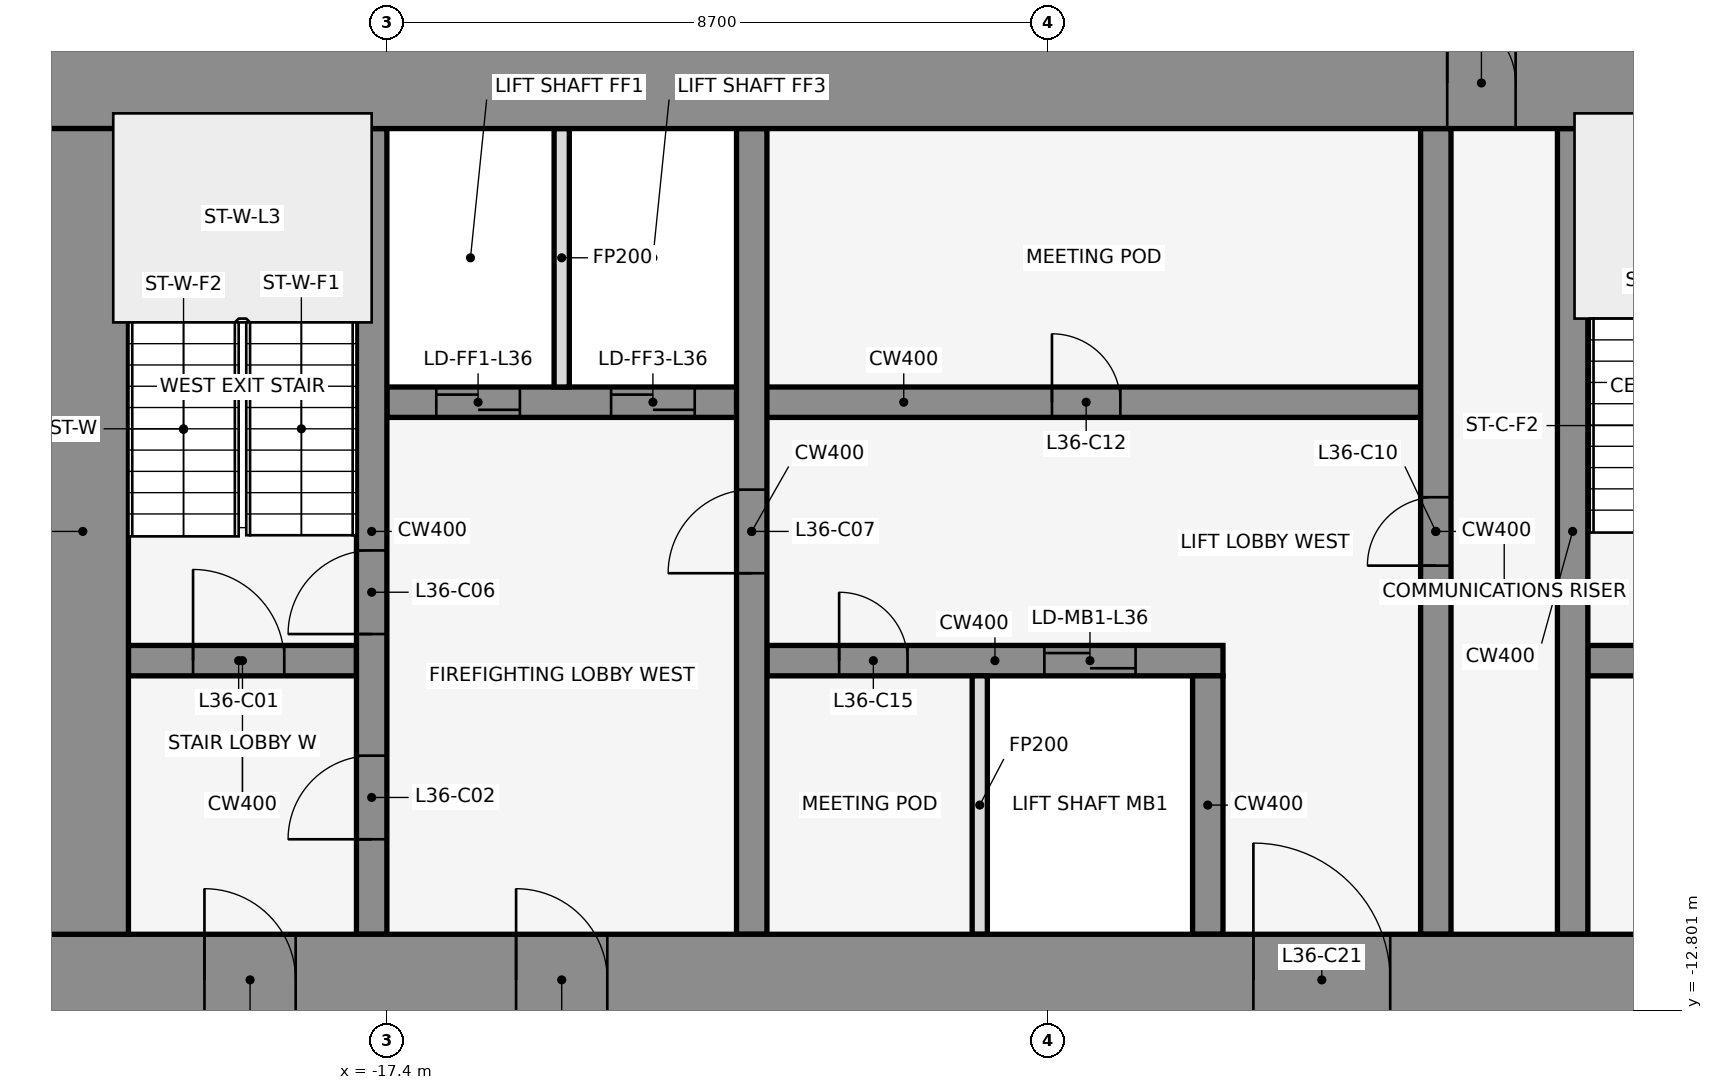
"""IFC4 building model, lengths in metres.
Left out: names, types, materials, properties, quantities, classifications, styles, units other than length and angle.
Written with IfcOpenShell. Run it as: python <this file> out.ifc"""

import sys

from ifc_helpers import new_model, si_unit, direction, frame, frame_2d, origin, place, context, subcontext, project, spatial, rectangle, extrude, element, fill, save


model = new_model("IFC4")
c1 = context("Model", 3, precision=1e-05, world=origin(), true_north=direction((0.0, 1.0)))
c2 = subcontext(c1, "Body", "Model", "MODEL_VIEW")
j1 = project(units=[si_unit("LENGTHUNIT", "METRE"), si_unit("PLANEANGLEUNIT", "RADIAN")], contexts=[c1])
p1 = place(None, origin())
s1 = spatial("IfcSite", under=j1, at=p1, CompositionType="ELEMENT")
p2 = place(p1, origin())
s2 = spatial("IfcBuilding", under=s1, at=p2, CompositionType="ELEMENT")
p3 = place(p2, frame((0.0, 0.0, 165.0)))
s3 = spatial("IfcBuildingStorey", under=s2, at=p3, CompositionType="ELEMENT", Elevation=165.0)
for number, where, z_axis, x_axis in (
    (1, (-0.068, -0.105, 0.0), (0.0, 0.0, 1.0), (-0.84, 0.543, 0.0)),
    (2, (-14.599, 1.08, 0.0), (0.0, 0.0, 1.0), (-0.84, -0.543, 0.0)),
):
    element("IfcWall", number, at=place(p3, frame(where, z_axis=z_axis, x_axis=x_axis)), inside=s3, PredefinedType="STANDARD", context=c2, shape_type="SweptSolid", body=[
        extrude(rectangle(XDim=2.183, YDim=0.25, at=frame_2d((1.091, 0.0))), origin(), (0.0, 0.0, 1.0), 3.95),
    ])
p4 = place(p3, frame((-20.8, -8.2, 0.0), z_axis=(0.0, 0.0, 1.0), x_axis=(1.0, 0.0, 0.0)))
e3 = element("IfcWall", 3, at=p4, inside=s3, PredefinedType="SHEAR", context=c2, shape_type="SweptSolid", body=[
    extrude(rectangle(XDim=3.0, YDim=0.4, at=frame_2d((1.5, 0.0))), origin(), (0.0, 0.0, 1.0), 4.1),
])
p5 = place(p4, frame((0.85, 0.0, 0.0)))
e4 = element("IfcOpeningElement", 4, at=p5, cuts=e3, PredefinedType="OPENING", context=c2, shape_type="SweptSolid", body=[
    extrude(rectangle(XDim=1.2, YDim=2.1, at=frame_2d((0.6, 1.05))), frame((0.0, 0.212, 0.0), z_axis=(0.0, -1.0, 0.0), x_axis=(1.0, 0.0, 0.0)), (0.0, 0.0, 1.0), 0.424),
])
p6 = place(p3, frame((-12.4, -8.2, 0.0), z_axis=(0.0, 0.0, 1.0), x_axis=(1.0, 0.0, 0.0)))
e5 = element("IfcWall", 5, at=p6, inside=s3, PredefinedType="SHEAR", context=c2, shape_type="SweptSolid", body=[
    extrude(rectangle(XDim=6.0, YDim=0.4, at=frame_2d((3.0, 0.0))), origin(), (0.0, 0.0, 1.0), 4.1),
])
p7 = place(p6, frame((3.65, 0.0, 0.0)))
e6 = element("IfcOpeningElement", 6, at=p7, cuts=e5, PredefinedType="OPENING", context=c2, shape_type="SweptSolid", body=[
    extrude(rectangle(XDim=1.2, YDim=2.1, at=frame_2d((0.6, 1.05))), frame((0.0, 0.212, 0.0), z_axis=(0.0, -1.0, 0.0), x_axis=(1.0, 0.0, 0.0)), (0.0, 0.0, 1.0), 0.424),
])
p8 = place(p6, frame((0.95, 0.0, 0.0)))
e7 = element("IfcOpeningElement", 7, at=p8, cuts=e5, PredefinedType="OPENING", context=c2, shape_type="SweptSolid", body=[
    extrude(rectangle(XDim=0.9, YDim=2.1, at=frame_2d((0.45, 1.05))), frame((0.0, 0.212, 0.0), z_axis=(0.0, -1.0, 0.0), x_axis=(1.0, 0.0, 0.0)), (0.0, 0.0, 1.0), 0.424),
])
p9 = place(p3, frame((-1.6, -8.2, 0.0), z_axis=(0.0, 0.0, 1.0), x_axis=(1.0, 0.0, 0.0)))
e8 = element("IfcWall", 8, at=p9, inside=s3, PredefinedType="SHEAR", context=c2, shape_type="SweptSolid", body=[
    extrude(rectangle(XDim=3.2, YDim=0.4, at=frame_2d((1.6, 0.0))), origin(), (0.0, 0.0, 1.0), 4.1),
])
p10 = place(p9, frame((1.05, 0.0, 0.0)))
e9 = element("IfcOpeningElement", 9, at=p10, cuts=e8, PredefinedType="OPENING", context=c2, shape_type="SweptSolid", body=[
    extrude(rectangle(XDim=1.2, YDim=2.1, at=frame_2d((0.6, 1.05))), frame((0.0, 0.212, 0.0), z_axis=(0.0, -1.0, 0.0), x_axis=(1.0, 0.0, 0.0)), (0.0, 0.0, 1.0), 0.424),
])
p11 = place(p3, frame((-17.4, -4.8, 0.0), z_axis=(0.0, 0.0, 1.0), x_axis=(1.0, 0.0, 0.0)))
e10 = element("IfcWall", 10, at=p11, inside=s3, PredefinedType="SHEAR", context=c2, shape_type="SweptSolid", body=[
    extrude(rectangle(XDim=13.6, YDim=0.4, at=frame_2d((6.8, 0.0))), origin(), (0.0, 0.0, 1.0), 4.1),
])
p12 = place(p11, frame((0.65, 0.0, 0.0)))
e11 = element("IfcOpeningElement", 11, at=p12, cuts=e10, PredefinedType="OPENING", context=c2, shape_type="SweptSolid", body=[
    extrude(rectangle(XDim=1.1, YDim=2.1, at=frame_2d((0.55, 1.05))), frame((0.0, 0.212, 0.0), z_axis=(0.0, -1.0, 0.0), x_axis=(1.0, 0.0, 0.0)), (0.0, 0.0, 1.0), 0.424),
])
p13 = place(p11, frame((2.95, 0.0, 0.0)))
e12 = element("IfcOpeningElement", 12, at=p13, cuts=e10, PredefinedType="OPENING", context=c2, shape_type="SweptSolid", body=[
    extrude(rectangle(XDim=1.1, YDim=2.1, at=frame_2d((0.55, 1.05))), frame((0.0, 0.212, 0.0), z_axis=(0.0, -1.0, 0.0), x_axis=(1.0, 0.0, 0.0)), (0.0, 0.0, 1.0), 0.424),
])
p14 = place(p11, frame((8.75, 0.0, 0.0)))
e13 = element("IfcOpeningElement", 13, at=p14, cuts=e10, PredefinedType="OPENING", context=c2, shape_type="SweptSolid", body=[
    extrude(rectangle(XDim=0.9, YDim=2.1, at=frame_2d((0.45, 1.05))), frame((0.0, 0.212, 0.0), z_axis=(0.0, -1.0, 0.0), x_axis=(1.0, 0.0, 0.0)), (0.0, 0.0, 1.0), 0.424),
])
p15 = place(p3, frame((-17.6, -11.8, 0.0), z_axis=(0.0, 0.0, 1.0), x_axis=(0.0, 1.0, 0.0)))
e14 = element("IfcWall", 14, at=p15, inside=s3, PredefinedType="SHEAR", context=c2, shape_type="SweptSolid", body=[
    extrude(rectangle(XDim=10.6, YDim=0.4, at=frame_2d((5.3, 0.0))), origin(), (0.0, 0.0, 1.0), 4.1),
])
p16 = place(p15, frame((1.25, 0.0, 0.0)))
e15 = element("IfcOpeningElement", 15, at=p16, cuts=e14, PredefinedType="OPENING", context=c2, shape_type="SweptSolid", body=[
    extrude(rectangle(XDim=1.1, YDim=2.1, at=frame_2d((0.55, 1.05))), frame((0.0, 0.212, 0.0), z_axis=(0.0, -1.0, 0.0), x_axis=(1.0, 0.0, 0.0)), (0.0, 0.0, 1.0), 0.424),
])
p17 = place(p15, frame((3.95, 0.0, 0.0)))
e16 = element("IfcOpeningElement", 16, at=p17, cuts=e14, PredefinedType="OPENING", context=c2, shape_type="SweptSolid", body=[
    extrude(rectangle(XDim=1.1, YDim=2.1, at=frame_2d((0.55, 1.05))), frame((0.0, 0.212, 0.0), z_axis=(0.0, -1.0, 0.0), x_axis=(1.0, 0.0, 0.0)), (0.0, 0.0, 1.0), 0.424),
])
p18 = place(p3, frame((-15.1, -4.6, 0.0), z_axis=(0.0, 0.0, 1.0), x_axis=(0.0, 1.0, 0.0)))
e17 = element("IfcWall", 17, at=p18, inside=s3, PredefinedType="PARTITIONING", context=c2, shape_type="SweptSolid", body=[
    extrude(rectangle(XDim=3.4, YDim=0.2, at=frame_2d((1.7, 0.0))), origin(), (0.0, 0.0, 1.0), 2.84),
])
p19 = place(p3, frame((-12.6, -11.8, 0.0), z_axis=(0.0, 0.0, 1.0), x_axis=(0.0, 1.0, 0.0)))
e18 = element("IfcWall", 18, at=p19, inside=s3, PredefinedType="SHEAR", context=c2, shape_type="SweptSolid", body=[
    extrude(rectangle(XDim=10.6, YDim=0.4, at=frame_2d((5.3, 0.0))), origin(), (0.0, 0.0, 1.0), 4.1),
])
p20 = place(p19, frame((4.75, 0.0, 0.0)))
e19 = element("IfcOpeningElement", 19, at=p20, cuts=e18, PredefinedType="OPENING", context=c2, shape_type="SweptSolid", body=[
    extrude(rectangle(XDim=1.1, YDim=2.1, at=frame_2d((0.55, 1.05))), frame((0.0, 0.212, 0.0), z_axis=(0.0, -1.0, 0.0), x_axis=(1.0, 0.0, 0.0)), (0.0, 0.0, 1.0), 0.424),
])
p21 = place(p3, frame((-9.6, -11.8, 0.0), z_axis=(0.0, 0.0, 1.0), x_axis=(0.0, 1.0, 0.0)))
e20 = element("IfcWall", 20, at=p21, inside=s3, PredefinedType="PARTITIONING", context=c2, shape_type="SweptSolid", body=[
    extrude(rectangle(XDim=3.4, YDim=0.2, at=frame_2d((1.7, 0.0))), origin(), (0.0, 0.0, 1.0), 2.84),
])
p22 = place(p3, frame((-6.6, -11.8, 0.0), z_axis=(0.0, 0.0, 1.0), x_axis=(0.0, 1.0, 0.0)))
e21 = element("IfcWall", 21, at=p22, inside=s3, PredefinedType="SHEAR", context=c2, shape_type="SweptSolid", body=[
    extrude(rectangle(XDim=3.4, YDim=0.4, at=frame_2d((1.7, 0.0))), origin(), (0.0, 0.0, 1.0), 4.1),
])
p23 = place(p3, frame((-3.6, -11.8, 0.0), z_axis=(0.0, 0.0, 1.0), x_axis=(0.0, 1.0, 0.0)))
e22 = element("IfcWall", 22, at=p23, inside=s3, PredefinedType="SHEAR", context=c2, shape_type="SweptSolid", body=[
    extrude(rectangle(XDim=10.6, YDim=0.4, at=frame_2d((5.3, 0.0))), origin(), (0.0, 0.0, 1.0), 4.1),
])
p24 = place(p23, frame((4.85, 0.0, 0.0)))
e23 = element("IfcOpeningElement", 23, at=p24, cuts=e22, PredefinedType="OPENING", context=c2, shape_type="SweptSolid", body=[
    extrude(rectangle(XDim=0.9, YDim=2.1, at=frame_2d((0.45, 1.05))), frame((0.0, 0.212, 0.0), z_axis=(0.0, -1.0, 0.0), x_axis=(1.0, 0.0, 0.0)), (0.0, 0.0, 1.0), 0.424),
])
p25 = place(p3, frame((-1.8, -11.8, 0.0), z_axis=(0.0, 0.0, 1.0), x_axis=(0.0, 1.0, 0.0)))
e24 = element("IfcWall", 24, at=p25, inside=s3, PredefinedType="SHEAR", context=c2, shape_type="SweptSolid", body=[
    extrude(rectangle(XDim=10.6, YDim=0.4, at=frame_2d((5.3, 0.0))), origin(), (0.0, 0.0, 1.0), 4.1),
])
p26 = place(p3, frame((-22.0, -0.6, 0.0), z_axis=(0.0, 0.0, 1.0), x_axis=(1.0, 0.0, 0.0)))
e25 = element("IfcWall", 25, at=p26, inside=s3, PredefinedType="SHEAR", context=c2, shape_type="SweptSolid", body=[
    extrude(rectangle(XDim=44.0, YDim=1.2, at=frame_2d((22.0, 0.0))), origin(), (0.0, 0.0, 1.0), 4.1),
])
p27 = place(p26, frame((18.55, 0.0, 0.0)))
e26 = element("IfcOpeningElement", 26, at=p27, cuts=e25, PredefinedType="OPENING", context=c2, shape_type="SweptSolid", body=[
    extrude(rectangle(XDim=0.9, YDim=2.1, at=frame_2d((0.45, 1.05))), frame((0.0, 0.612, 0.0), z_axis=(0.0, -1.0, 0.0), x_axis=(1.0, 0.0, 0.0)), (0.0, 0.0, 1.0), 1.224),
])
p28 = place(p26, frame((24.55, 0.0, 0.0)))
e27 = element("IfcOpeningElement", 27, at=p28, cuts=e25, PredefinedType="OPENING", context=c2, shape_type="SweptSolid", body=[
    extrude(rectangle(XDim=0.9, YDim=2.1, at=frame_2d((0.45, 1.05))), frame((0.0, 0.612, 0.0), z_axis=(0.0, -1.0, 0.0), x_axis=(1.0, 0.0, 0.0)), (0.0, 0.0, 1.0), 1.224),
])
p29 = place(p3, frame((-22.0, -12.4, 0.0), z_axis=(0.0, 0.0, 1.0), x_axis=(1.0, 0.0, 0.0)))
e28 = element("IfcWall", 28, at=p29, inside=s3, PredefinedType="SHEAR", context=c2, shape_type="SweptSolid", body=[
    extrude(rectangle(XDim=44.0, YDim=1.2, at=frame_2d((22.0, 0.0))), origin(), (0.0, 0.0, 1.0), 4.1),
])
p30 = place(p29, frame((2.2, 0.0, 0.0)))
e29 = element("IfcOpeningElement", 29, at=p30, cuts=e28, PredefinedType="OPENING", context=c2, shape_type="SweptSolid", body=[
    extrude(rectangle(XDim=1.2, YDim=2.1, at=frame_2d((0.6, 1.05))), frame((0.0, 0.612, 0.0), z_axis=(0.0, -1.0, 0.0), x_axis=(1.0, 0.0, 0.0)), (0.0, 0.0, 1.0), 1.224),
])
p31 = place(p29, frame((21.4, 0.0, 0.0)))
e30 = element("IfcOpeningElement", 30, at=p31, cuts=e28, PredefinedType="OPENING", context=c2, shape_type="SweptSolid", body=[
    extrude(rectangle(XDim=1.2, YDim=2.1, at=frame_2d((0.6, 1.05))), frame((0.0, 0.612, 0.0), z_axis=(0.0, -1.0, 0.0), x_axis=(1.0, 0.0, 0.0)), (0.0, 0.0, 1.0), 1.224),
])
p32 = place(p29, frame((40.6, 0.0, 0.0)))
e31 = element("IfcOpeningElement", 31, at=p32, cuts=e28, PredefinedType="OPENING", context=c2, shape_type="SweptSolid", body=[
    extrude(rectangle(XDim=1.2, YDim=2.1, at=frame_2d((0.6, 1.05))), frame((0.0, 0.612, 0.0), z_axis=(0.0, -1.0, 0.0), x_axis=(1.0, 0.0, 0.0)), (0.0, 0.0, 1.0), 1.224),
])
p33 = place(p29, frame((16.0, 0.0, 0.0)))
e32 = element("IfcOpeningElement", 32, at=p33, cuts=e28, PredefinedType="OPENING", context=c2, shape_type="SweptSolid", body=[
    extrude(rectangle(XDim=1.8, YDim=2.1, at=frame_2d((0.9, 1.05))), frame((0.0, 0.612, 0.0), z_axis=(0.0, -1.0, 0.0), x_axis=(1.0, 0.0, 0.0)), (0.0, 0.0, 1.0), 1.224),
])
p34 = place(p29, frame((6.3, 0.0, 0.0)))
e33 = element("IfcOpeningElement", 33, at=p34, cuts=e28, PredefinedType="OPENING", context=c2, shape_type="SweptSolid", body=[
    extrude(rectangle(XDim=1.2, YDim=2.1, at=frame_2d((0.6, 1.05))), frame((0.0, 0.612, 0.0), z_axis=(0.0, -1.0, 0.0), x_axis=(1.0, 0.0, 0.0)), (0.0, 0.0, 1.0), 1.224),
])
p35 = place(p29, frame((26.2, 0.0, 0.0)))
e34 = element("IfcOpeningElement", 34, at=p35, cuts=e28, PredefinedType="OPENING", context=c2, shape_type="SweptSolid", body=[
    extrude(rectangle(XDim=1.8, YDim=2.1, at=frame_2d((0.9, 1.05))), frame((0.0, 0.612, 0.0), z_axis=(0.0, -1.0, 0.0), x_axis=(1.0, 0.0, 0.0)), (0.0, 0.0, 1.0), 1.224),
])
p36 = place(p29, frame((36.5, 0.0, 0.0)))
e35 = element("IfcOpeningElement", 35, at=p36, cuts=e28, PredefinedType="OPENING", context=c2, shape_type="SweptSolid", body=[
    extrude(rectangle(XDim=1.2, YDim=2.1, at=frame_2d((0.6, 1.05))), frame((0.0, 0.612, 0.0), z_axis=(0.0, -1.0, 0.0), x_axis=(1.0, 0.0, 0.0)), (0.0, 0.0, 1.0), 1.224),
])
p37 = place(p3, frame((-21.4, -11.8, 0.0), z_axis=(0.0, 0.0, 1.0), x_axis=(0.0, 1.0, 0.0)))
e36 = element("IfcWall", 36, at=p37, inside=s3, PredefinedType="SHEAR", context=c2, shape_type="SweptSolid", body=[
    extrude(rectangle(XDim=10.6, YDim=1.2, at=frame_2d((5.3, 0.0))), origin(), (0.0, 0.0, 1.0), 4.1),
])
p38 = place(p5, origin())
e37 = element("IfcDoor", 37, at=p38, inside=s3, OperationType="SINGLE_SWING_LEFT", PredefinedType="DOOR", context=c2, shape_type="SweptSolid", body=[
    extrude(rectangle(XDim=1.2, YDim=2.1, at=frame_2d((0.6, 1.05))), frame((0.0, 0.025, 0.0), z_axis=(0.0, -1.0, 0.0), x_axis=(1.0, 0.0, 0.0)), (0.0, 0.0, 1.0), 0.05),
])
fill(e4, e37)
p39 = place(p16, frame((1.1, 0.0, 0.0), z_axis=(0.0, 0.0, 1.0), x_axis=(-1.0, 0.0, 0.0)))
e38 = element("IfcDoor", 38, at=p39, inside=s3, OperationType="SINGLE_SWING_LEFT", PredefinedType="DOOR", context=c2, shape_type="SweptSolid", body=[
    extrude(rectangle(XDim=1.1, YDim=2.1, at=frame_2d((0.55, 1.05))), frame((0.0, 0.025, 0.0), z_axis=(0.0, -1.0, 0.0), x_axis=(1.0, 0.0, 0.0)), (0.0, 0.0, 1.0), 0.05),
])
fill(e15, e38)
p40 = place(p12, origin())
e39 = element("IfcDoor", 39, at=p40, inside=s3, OperationType="DOUBLE_DOOR_SLIDING", PredefinedType="DOOR", context=c2, shape_type="SweptSolid", body=[
    extrude(rectangle(XDim=1.1, YDim=2.1, at=frame_2d((0.55, 1.05))), frame((0.0, 0.025, 0.0), z_axis=(0.0, -1.0, 0.0), x_axis=(1.0, 0.0, 0.0)), (0.0, 0.0, 1.0), 0.05),
])
fill(e11, e39)
p41 = place(p13, origin())
e40 = element("IfcDoor", 40, at=p41, inside=s3, OperationType="DOUBLE_DOOR_SLIDING", PredefinedType="DOOR", context=c2, shape_type="SweptSolid", body=[
    extrude(rectangle(XDim=1.1, YDim=2.1, at=frame_2d((0.55, 1.05))), frame((0.0, 0.025, 0.0), z_axis=(0.0, -1.0, 0.0), x_axis=(1.0, 0.0, 0.0)), (0.0, 0.0, 1.0), 0.05),
])
fill(e12, e40)
p42 = place(p7, origin())
e41 = element("IfcDoor", 41, at=p42, inside=s3, OperationType="DOUBLE_DOOR_SLIDING", PredefinedType="DOOR", context=c2, shape_type="SweptSolid", body=[
    extrude(rectangle(XDim=1.2, YDim=2.1, at=frame_2d((0.6, 1.05))), frame((0.0, 0.025, 0.0), z_axis=(0.0, -1.0, 0.0), x_axis=(1.0, 0.0, 0.0)), (0.0, 0.0, 1.0), 0.05),
])
fill(e6, e41)
p43 = place(p17, frame((1.1, 0.0, 0.0), z_axis=(0.0, 0.0, 1.0), x_axis=(-1.0, 0.0, 0.0)))
e42 = element("IfcDoor", 42, at=p43, inside=s3, OperationType="SINGLE_SWING_LEFT", PredefinedType="DOOR", context=c2, shape_type="SweptSolid", body=[
    extrude(rectangle(XDim=1.1, YDim=2.1, at=frame_2d((0.55, 1.05))), frame((0.0, 0.025, 0.0), z_axis=(0.0, -1.0, 0.0), x_axis=(1.0, 0.0, 0.0)), (0.0, 0.0, 1.0), 0.05),
])
fill(e16, e42)
p44 = place(p20, origin())
e43 = element("IfcDoor", 43, at=p44, inside=s3, OperationType="SINGLE_SWING_LEFT", PredefinedType="DOOR", context=c2, shape_type="SweptSolid", body=[
    extrude(rectangle(XDim=1.1, YDim=2.1, at=frame_2d((0.55, 1.05))), frame((0.0, 0.025, 0.0), z_axis=(0.0, -1.0, 0.0), x_axis=(1.0, 0.0, 0.0)), (0.0, 0.0, 1.0), 0.05),
])
fill(e19, e43)
p45 = place(p24, frame((0.9, 0.0, 0.0), z_axis=(0.0, 0.0, 1.0), x_axis=(-1.0, 0.0, 0.0)))
e44 = element("IfcDoor", 44, at=p45, inside=s3, OperationType="SINGLE_SWING_LEFT", PredefinedType="DOOR", context=c2, shape_type="SweptSolid", body=[
    extrude(rectangle(XDim=0.9, YDim=2.1, at=frame_2d((0.45, 1.05))), frame((0.0, 0.025, 0.0), z_axis=(0.0, -1.0, 0.0), x_axis=(1.0, 0.0, 0.0)), (0.0, 0.0, 1.0), 0.05),
])
fill(e23, e44)
p46 = place(p14, origin())
e45 = element("IfcDoor", 45, at=p46, inside=s3, OperationType="SINGLE_SWING_RIGHT", PredefinedType="DOOR", context=c2, shape_type="SweptSolid", body=[
    extrude(rectangle(XDim=0.9, YDim=2.1, at=frame_2d((0.45, 1.05))), frame((0.0, 0.025, 0.0), z_axis=(0.0, -1.0, 0.0), x_axis=(1.0, 0.0, 0.0)), (0.0, 0.0, 1.0), 0.05),
])
fill(e13, e45)
p47 = place(p8, frame((0.9, 0.0, 0.0), z_axis=(0.0, 0.0, 1.0), x_axis=(-1.0, 0.0, 0.0)))
e46 = element("IfcDoor", 46, at=p47, inside=s3, OperationType="SINGLE_SWING_RIGHT", PredefinedType="DOOR", context=c2, shape_type="SweptSolid", body=[
    extrude(rectangle(XDim=0.9, YDim=2.1, at=frame_2d((0.45, 1.05))), frame((0.0, 0.025, 0.0), z_axis=(0.0, -1.0, 0.0), x_axis=(1.0, 0.0, 0.0)), (0.0, 0.0, 1.0), 0.05),
])
fill(e7, e46)
p48 = place(p27, origin())
e47 = element("IfcDoor", 47, at=p48, inside=s3, OperationType="SINGLE_SWING_LEFT", PredefinedType="DOOR", context=c2, shape_type="SweptSolid", body=[
    extrude(rectangle(XDim=0.9, YDim=2.1, at=frame_2d((0.45, 1.05))), frame((0.0, 0.025, 0.0), z_axis=(0.0, -1.0, 0.0), x_axis=(1.0, 0.0, 0.0)), (0.0, 0.0, 1.0), 0.05),
])
fill(e26, e47)
p49 = place(p30, frame((1.2, 0.0, 0.0), z_axis=(0.0, 0.0, 1.0), x_axis=(-1.0, 0.0, 0.0)))
e48 = element("IfcDoor", 48, at=p49, inside=s3, OperationType="SINGLE_SWING_RIGHT", PredefinedType="DOOR", context=c2, shape_type="SweptSolid", body=[
    extrude(rectangle(XDim=1.2, YDim=2.1, at=frame_2d((0.6, 1.05))), frame((0.0, 0.025, 0.0), z_axis=(0.0, -1.0, 0.0), x_axis=(1.0, 0.0, 0.0)), (0.0, 0.0, 1.0), 0.05),
])
fill(e29, e48)
p50 = place(p33, origin())
e49 = element("IfcDoor", 49, at=p50, inside=s3, OperationType="SINGLE_SWING_LEFT", PredefinedType="DOOR", context=c2, shape_type="SweptSolid", body=[
    extrude(rectangle(XDim=1.8, YDim=2.1, at=frame_2d((0.9, 1.05))), frame((0.0, 0.025, 0.0), z_axis=(0.0, -1.0, 0.0), x_axis=(1.0, 0.0, 0.0)), (0.0, 0.0, 1.0), 0.05),
])
fill(e32, e49)
p51 = place(p34, frame((1.2, 0.0, 0.0), z_axis=(0.0, 0.0, 1.0), x_axis=(-1.0, 0.0, 0.0)))
e50 = element("IfcDoor", 50, at=p51, inside=s3, OperationType="SINGLE_SWING_RIGHT", PredefinedType="DOOR", context=c2, shape_type="SweptSolid", body=[
    extrude(rectangle(XDim=1.2, YDim=2.1, at=frame_2d((0.6, 1.05))), frame((0.0, 0.025, 0.0), z_axis=(0.0, -1.0, 0.0), x_axis=(1.0, 0.0, 0.0)), (0.0, 0.0, 1.0), 0.05),
])
fill(e33, e50)
save(model, sys.argv[1])
